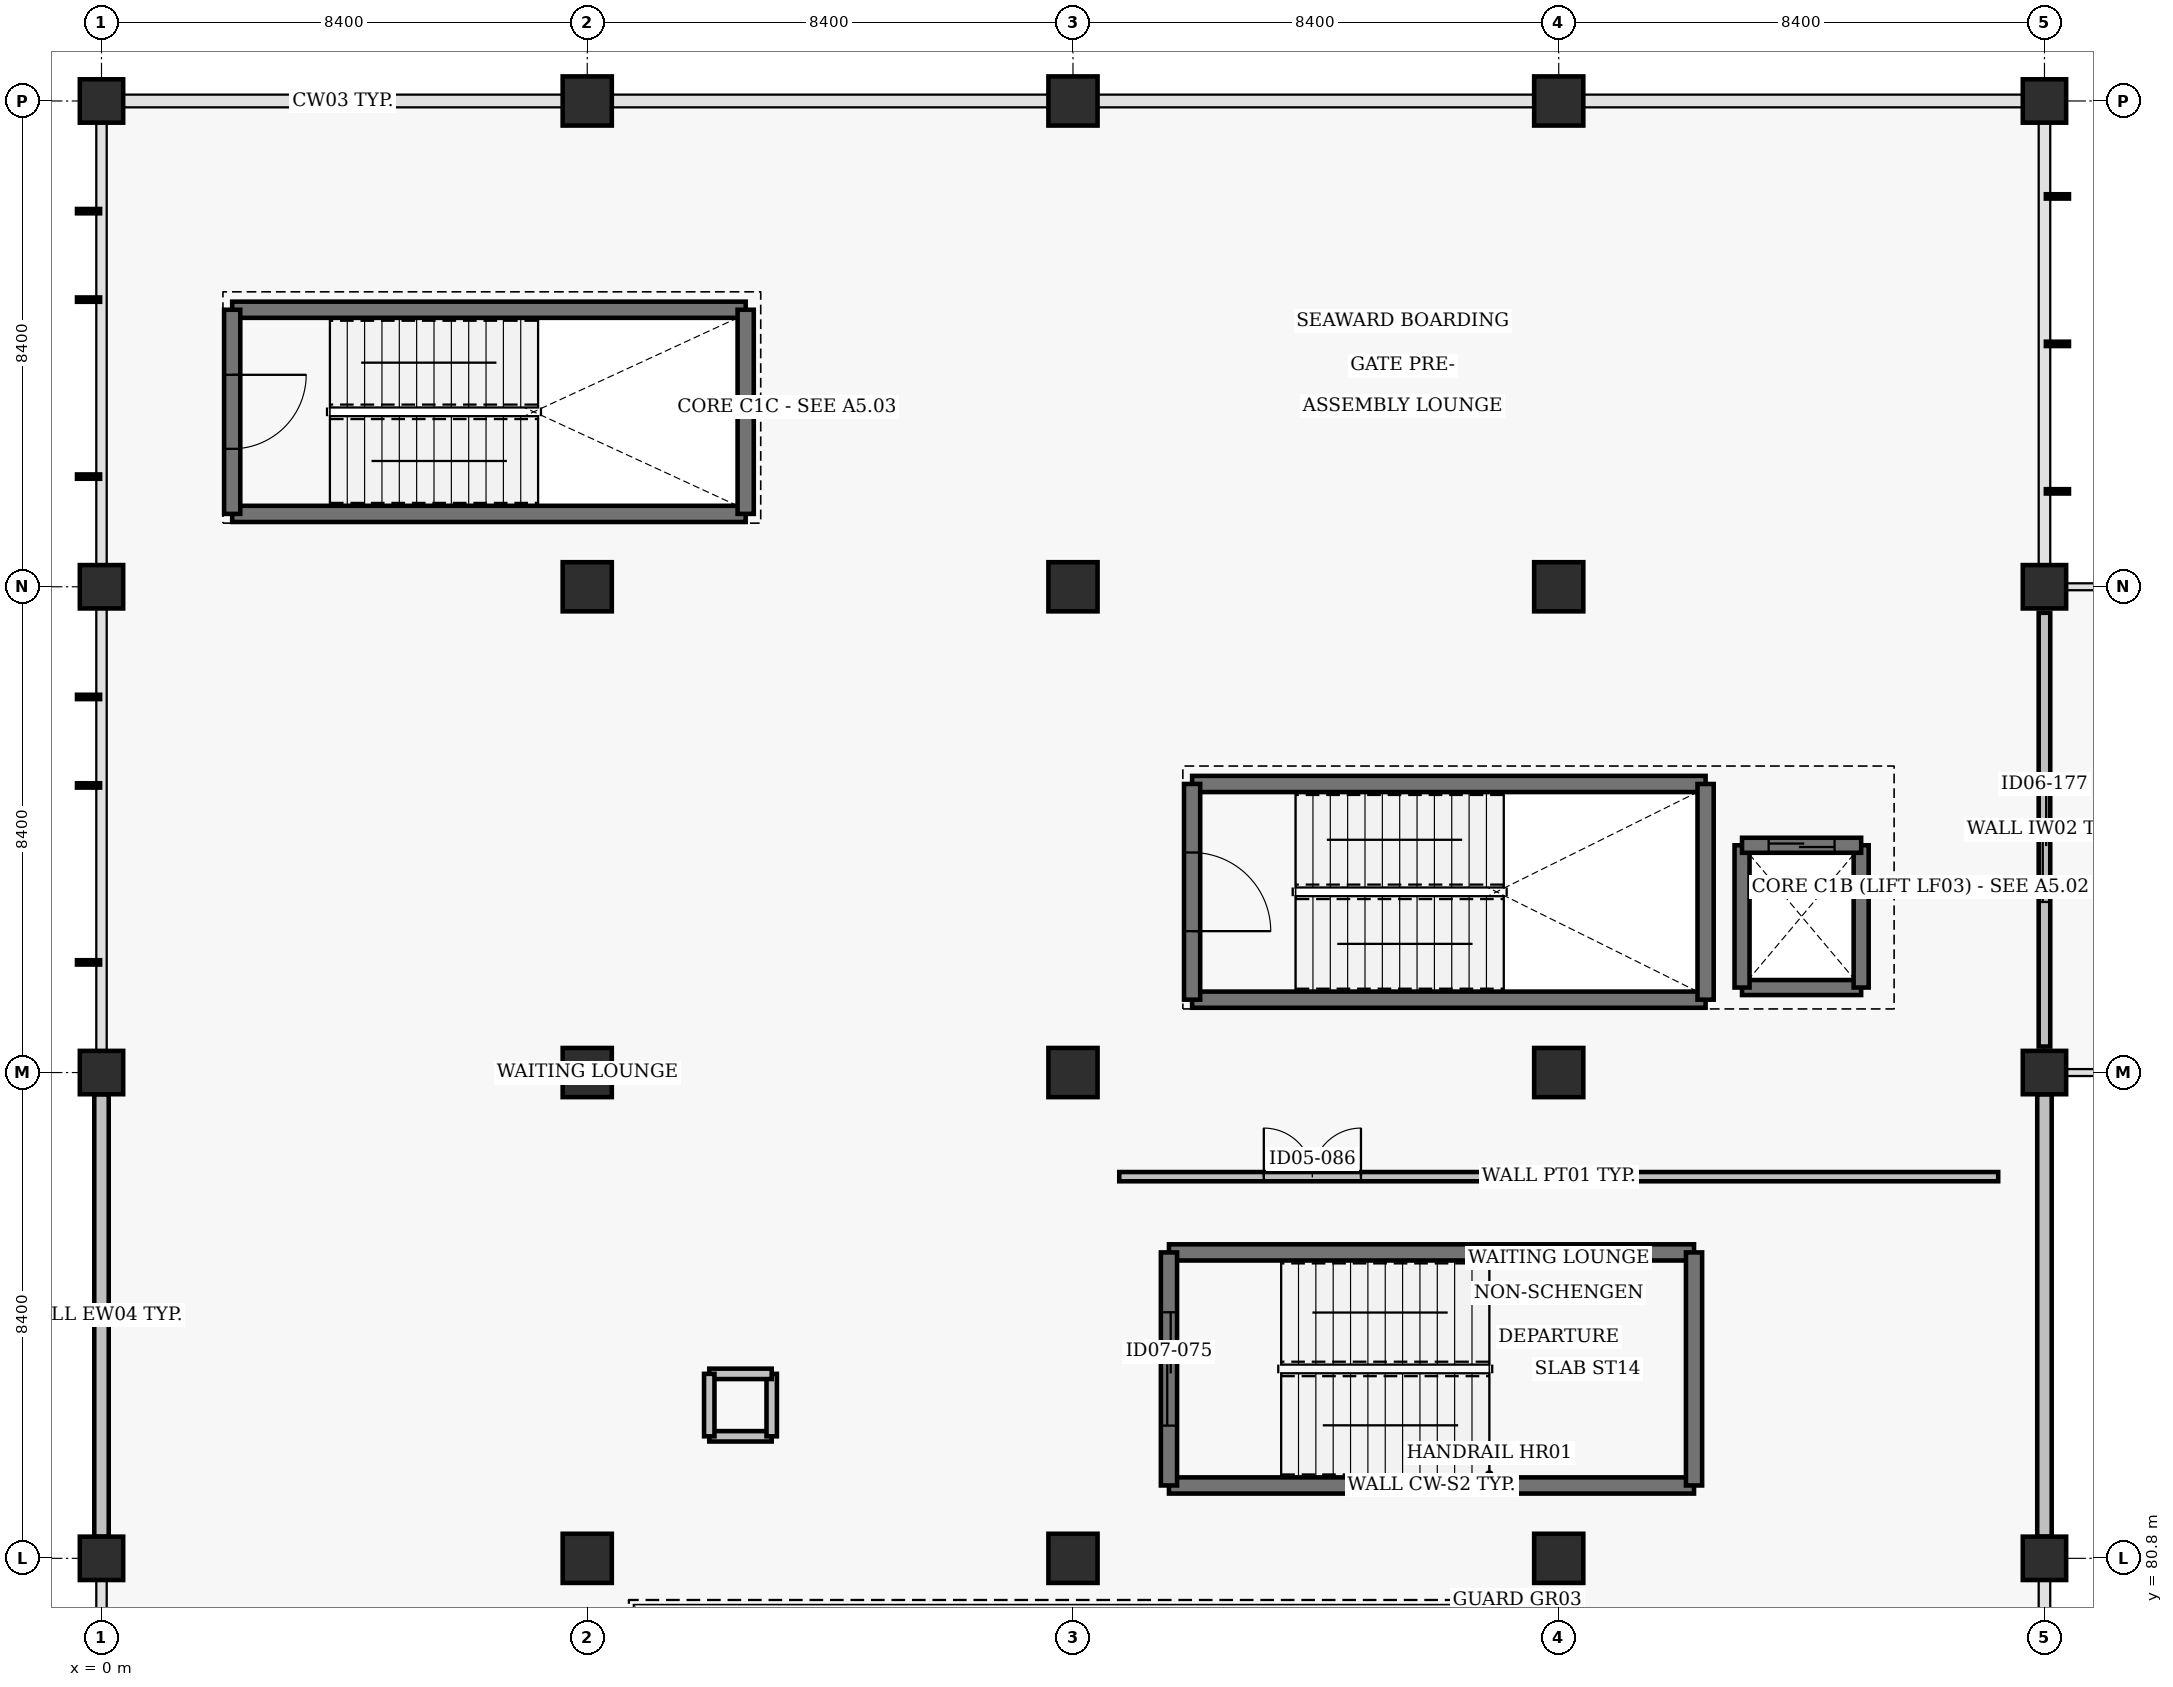
"""IFC4 building model, lengths in metres.
Left out: names, types, materials, properties, quantities, classifications, styles, units other than length and angle.
Written with IfcOpenShell. Run it as: python <this file> out.ifc"""

import sys

from ifc_helpers import new_model, si_unit, direction, frame, frame_2d, origin, origin_2d, place, context, subcontext, project, spatial, rectangle, circle, extrude, element, fill, save


model = new_model("IFC4")
c1 = context("Model", 3, precision=1e-05, world=origin(), true_north=direction((0.0, 1.0)))
c2 = subcontext(c1, "Body", "Model", "MODEL_VIEW")
j1 = project(units=[si_unit("LENGTHUNIT", "METRE"), si_unit("PLANEANGLEUNIT", "RADIAN")], contexts=[c1])
p1 = place(None, origin())
s1 = spatial("IfcSite", under=j1, at=p1, CompositionType="ELEMENT")
p2 = place(p1, origin())
s2 = spatial("IfcBuilding", under=s1, at=p2, CompositionType="ELEMENT")
p3 = place(p2, frame((0.0, 0.0, 5.44)))
s3 = spatial("IfcBuildingStorey", under=s2, at=p3, CompositionType="ELEMENT", Elevation=5.44)
for number, where, z_axis, x_axis in (
    (1, (0.0, 80.8, 0.0), (0.0, 0.0, 1.0), (1.0, 0.0, 0.0)),
    (2, (0.0, 89.2, 0.0), (0.0, 0.0, 1.0), (1.0, 0.0, 0.0)),
    (3, (0.0, 97.6, 0.0), (0.0, 0.0, 1.0), (1.0, 0.0, 0.0)),
    (4, (0.0, 106.0, 0.0), (0.0, 0.0, 1.0), (1.0, 0.0, 0.0)),
):
    element("IfcColumn", number, at=place(p3, frame(where, z_axis=z_axis, x_axis=x_axis)), inside=s3, PredefinedType="COLUMN", context=c2, shape_type="SweptSolid", body=[
        extrude(rectangle(XDim=0.75, YDim=0.75, at=origin_2d()), origin(), (0.0, 0.0, 1.0), 4.16),
    ])
for number, where, z_axis, x_axis in (
    (5, (8.4, 80.8, 0.0), (0.0, 0.0, 1.0), (1.0, 0.0, 0.0)),
    (6, (8.4, 89.2, 0.0), (0.0, 0.0, 1.0), (1.0, 0.0, 0.0)),
    (7, (8.4, 97.6, 0.0), (0.0, 0.0, 1.0), (1.0, 0.0, 0.0)),
    (8, (8.4, 106.0, 0.0), (0.0, 0.0, 1.0), (1.0, 0.0, 0.0)),
    (9, (16.8, 80.8, 0.0), (0.0, 0.0, 1.0), (1.0, 0.0, 0.0)),
    (10, (16.8, 89.2, 0.0), (0.0, 0.0, 1.0), (1.0, 0.0, 0.0)),
    (11, (16.8, 97.6, 0.0), (0.0, 0.0, 1.0), (1.0, 0.0, 0.0)),
    (12, (16.8, 106.0, 0.0), (0.0, 0.0, 1.0), (1.0, 0.0, 0.0)),
    (13, (25.2, 80.8, 0.0), (0.0, 0.0, 1.0), (1.0, 0.0, 0.0)),
    (14, (25.2, 89.2, 0.0), (0.0, 0.0, 1.0), (1.0, 0.0, 0.0)),
    (15, (25.2, 97.6, 0.0), (0.0, 0.0, 1.0), (1.0, 0.0, 0.0)),
    (16, (25.2, 106.0, 0.0), (0.0, 0.0, 1.0), (1.0, 0.0, 0.0)),
):
    element("IfcColumn", number, at=place(p3, frame(where, z_axis=z_axis, x_axis=x_axis)), inside=s3, PredefinedType="COLUMN", context=c2, shape_type="SweptSolid", body=[
        extrude(circle(Radius=0.425, at=origin_2d()), origin(), (0.0, 0.0, 1.0), 4.16),
    ])
for number, where, z_axis, x_axis in (
    (17, (33.6, 80.8, 0.0), (0.0, 0.0, 1.0), (1.0, 0.0, 0.0)),
    (18, (33.6, 89.2, 0.0), (0.0, 0.0, 1.0), (1.0, 0.0, 0.0)),
    (19, (33.6, 97.6, 0.0), (0.0, 0.0, 1.0), (1.0, 0.0, 0.0)),
    (20, (33.6, 106.0, 0.0), (0.0, 0.0, 1.0), (1.0, 0.0, 0.0)),
):
    element("IfcColumn", number, at=place(p3, frame(where, z_axis=z_axis, x_axis=x_axis)), inside=s3, PredefinedType="COLUMN", context=c2, shape_type="SweptSolid", body=[
        extrude(rectangle(XDim=0.75, YDim=0.75, at=origin_2d()), origin(), (0.0, 0.0, 1.0), 4.16),
    ])
for number, where, z_axis, x_axis in (
    (21, (0.0, 88.825, 0.0), (0.0, 0.0, 1.0), (0.0, -1.0, 0.0)),
    (22, (33.6, 81.175, 0.0), (0.0, 0.0, 1.0), (0.0, 1.0, 0.0)),
):
    element("IfcWall", number, at=place(p3, frame(where, z_axis=z_axis, x_axis=x_axis)), inside=s3, PredefinedType="SOLIDWALL", context=c2, shape_type="SweptSolid", body=[
        extrude(rectangle(XDim=7.65, YDim=0.25, at=frame_2d((3.825, 0.0))), origin(), (0.0, 0.0, 1.0), 3.515),
    ])
for number, where, z_axis, x_axis in (
    (23, (18.86, 90.46, 0.0), (0.0, 0.0, 1.0), (1.0, 0.0, 0.0)),
    (24, (18.86, 94.19, 0.0), (0.0, 0.0, 1.0), (1.0, 0.0, 0.0)),
):
    element("IfcWall", number, at=place(p3, frame(where, z_axis=z_axis, x_axis=x_axis)), inside=s3, PredefinedType="SHEAR", context=c2, shape_type="SweptSolid", body=[
        extrude(rectangle(XDim=8.88, YDim=0.28, at=frame_2d((4.44, 0.0))), origin(), (0.0, 0.0, 1.0), 4.16),
    ])
p4 = place(p3, frame((18.86, 94.19, 0.0), z_axis=(0.0, 0.0, 1.0), x_axis=(0.0, -1.0, 0.0)))
e25 = element("IfcWall", 25, at=p4, inside=s3, PredefinedType="SHEAR", context=c2, shape_type="SweptSolid", body=[
    extrude(rectangle(XDim=3.73, YDim=0.28, at=frame_2d((1.865, 0.0))), origin(), (0.0, 0.0, 1.0), 4.16),
])
p5 = place(p4, frame((1.185, 0.0, 0.0)))
e26 = element("IfcOpeningElement", 26, at=p5, cuts=e25, PredefinedType="OPENING", context=c2, shape_type="SweptSolid", body=[
    extrude(rectangle(XDim=1.36, YDim=2.15, at=frame_2d((0.68, 1.075))), frame((0.0, 0.15, 0.0), z_axis=(0.0, -1.0, 0.0), x_axis=(1.0, 0.0, 0.0)), (0.0, 0.0, 1.0), 0.3),
])
p6 = place(p3, frame((27.74, 90.46, 0.0), z_axis=(0.0, 0.0, 1.0), x_axis=(0.0, 1.0, 0.0)))
e27 = element("IfcWall", 27, at=p6, inside=s3, PredefinedType="SHEAR", context=c2, shape_type="SweptSolid", body=[
    extrude(rectangle(XDim=3.73, YDim=0.28, at=frame_2d((1.865, 0.0))), origin(), (0.0, 0.0, 1.0), 4.16),
])
p7 = place(p3, frame((28.37, 90.67, 0.0), z_axis=(0.0, 0.0, 1.0), x_axis=(1.0, 0.0, 0.0)))
e28 = element("IfcWall", 28, at=p7, inside=s3, PredefinedType="SHEAR", context=c2, shape_type="SweptSolid", body=[
    extrude(rectangle(XDim=2.06, YDim=0.26, at=frame_2d((1.03, 0.0))), origin(), (0.0, 0.0, 1.0), 4.16),
])
for number, where, z_axis, x_axis in (
    (29, (30.43, 90.67, 0.0), (0.0, 0.0, 1.0), (0.0, 1.0, 0.0)),
    (30, (28.37, 93.13, 0.0), (0.0, 0.0, 1.0), (0.0, -1.0, 0.0)),
):
    element("IfcWall", number, at=place(p3, frame(where, z_axis=z_axis, x_axis=x_axis)), inside=s3, PredefinedType="SHEAR", context=c2, shape_type="SweptSolid", body=[
        extrude(rectangle(XDim=2.46, YDim=0.26, at=frame_2d((1.23, 0.0))), origin(), (0.0, 0.0, 1.0), 4.16),
    ])
p8 = place(p3, frame((28.37, 93.13, 0.0), z_axis=(0.0, 0.0, 1.0), x_axis=(1.0, 0.0, 0.0)))
e31 = element("IfcWall", 31, at=p8, inside=s3, PredefinedType="SHEAR", context=c2, shape_type="SweptSolid", body=[
    extrude(rectangle(XDim=2.06, YDim=0.26, at=frame_2d((1.03, 0.0))), origin(), (0.0, 0.0, 1.0), 4.16),
])
p9 = place(p8, frame((0.46, 0.0, 0.0)))
e32 = element("IfcOpeningElement", 32, at=p9, cuts=e31, PredefinedType="OPENING", context=c2, shape_type="SweptSolid", body=[
    extrude(rectangle(XDim=1.14, YDim=2.14, at=frame_2d((0.57, 1.07))), frame((0.0, 0.14, 0.0), z_axis=(0.0, -1.0, 0.0), x_axis=(1.0, 0.0, 0.0)), (0.0, 0.0, 1.0), 0.28),
])
for number, where, z_axis, x_axis in (
    (33, (2.26, 98.86, 0.0), (0.0, 0.0, 1.0), (1.0, 0.0, 0.0)),
    (34, (2.26, 102.39, 0.0), (0.0, 0.0, 1.0), (1.0, 0.0, 0.0)),
):
    element("IfcWall", number, at=place(p3, frame(where, z_axis=z_axis, x_axis=x_axis)), inside=s3, PredefinedType="SHEAR", context=c2, shape_type="SweptSolid", body=[
        extrude(rectangle(XDim=8.88, YDim=0.28, at=frame_2d((4.44, 0.0))), origin(), (0.0, 0.0, 1.0), 4.16),
    ])
p10 = place(p3, frame((2.26, 102.39, 0.0), z_axis=(0.0, 0.0, 1.0), x_axis=(0.0, -1.0, 0.0)))
e35 = element("IfcWall", 35, at=p10, inside=s3, PredefinedType="SHEAR", context=c2, shape_type="SweptSolid", body=[
    extrude(rectangle(XDim=3.53, YDim=0.28, at=frame_2d((1.765, 0.0))), origin(), (0.0, 0.0, 1.0), 4.16),
])
p11 = place(p10, frame((1.125, 0.0, 0.0)))
e36 = element("IfcOpeningElement", 36, at=p11, cuts=e35, PredefinedType="OPENING", context=c2, shape_type="SweptSolid", body=[
    extrude(rectangle(XDim=1.28, YDim=2.1, at=frame_2d((0.64, 1.05))), frame((0.0, 0.15, 0.0), z_axis=(0.0, -1.0, 0.0), x_axis=(1.0, 0.0, 0.0)), (0.0, 0.0, 1.0), 0.3),
])
p12 = place(p3, frame((11.14, 98.86, 0.0), z_axis=(0.0, 0.0, 1.0), x_axis=(0.0, 1.0, 0.0)))
e37 = element("IfcWall", 37, at=p12, inside=s3, PredefinedType="SHEAR", context=c2, shape_type="SweptSolid", body=[
    extrude(rectangle(XDim=3.53, YDim=0.28, at=frame_2d((1.765, 0.0))), origin(), (0.0, 0.0, 1.0), 4.16),
])
for number, where, z_axis, x_axis in (
    (38, (18.46, 82.06, 0.0), (0.0, 0.0, 1.0), (1.0, 0.0, 0.0)),
    (39, (18.46, 86.09, 0.0), (0.0, 0.0, 1.0), (1.0, 0.0, 0.0)),
):
    element("IfcWall", number, at=place(p3, frame(where, z_axis=z_axis, x_axis=x_axis)), inside=s3, PredefinedType="SHEAR", context=c2, shape_type="SweptSolid", body=[
        extrude(rectangle(XDim=9.08, YDim=0.28, at=frame_2d((4.54, 0.0))), origin(), (0.0, 0.0, 1.0), 4.16),
    ])
p13 = place(p3, frame((18.46, 86.09, 0.0), z_axis=(0.0, 0.0, 1.0), x_axis=(0.0, -1.0, 0.0)))
e40 = element("IfcWall", 40, at=p13, inside=s3, PredefinedType="SHEAR", context=c2, shape_type="SweptSolid", body=[
    extrude(rectangle(XDim=4.03, YDim=0.28, at=frame_2d((2.015, 0.0))), origin(), (0.0, 0.0, 1.0), 4.16),
])
p14 = place(p13, frame((1.035, 0.0, 0.0)))
e41 = element("IfcOpeningElement", 41, at=p14, cuts=e40, PredefinedType="OPENING", context=c2, shape_type="SweptSolid", body=[
    extrude(rectangle(XDim=1.96, YDim=2.22, at=frame_2d((0.98, 1.11))), frame((0.0, 0.15, 0.0), z_axis=(0.0, -1.0, 0.0), x_axis=(1.0, 0.0, 0.0)), (0.0, 0.0, 1.0), 0.3),
])
p15 = place(p3, frame((27.54, 82.06, 0.0), z_axis=(0.0, 0.0, 1.0), x_axis=(0.0, 1.0, 0.0)))
e42 = element("IfcWall", 42, at=p15, inside=s3, PredefinedType="SHEAR", context=c2, shape_type="SweptSolid", body=[
    extrude(rectangle(XDim=4.03, YDim=0.28, at=frame_2d((2.015, 0.0))), origin(), (0.0, 0.0, 1.0), 4.16),
])
for number, where, z_axis, x_axis in (
    (43, (10.51, 82.91, 0.0), (0.0, 0.0, 1.0), (1.0, 0.0, 0.0)),
    (44, (11.59, 82.91, 0.0), (0.0, 0.0, 1.0), (0.0, 1.0, 0.0)),
    (45, (11.59, 83.99, 0.0), (0.0, 0.0, 1.0), (-1.0, 0.0, 0.0)),
    (46, (10.51, 83.99, 0.0), (0.0, 0.0, 1.0), (0.0, -1.0, 0.0)),
):
    element("IfcWall", number, at=place(p3, frame(where, z_axis=z_axis, x_axis=x_axis)), inside=s3, PredefinedType="SOLIDWALL", context=c2, shape_type="SweptSolid", body=[
        extrude(rectangle(XDim=1.08, YDim=0.18, at=frame_2d((0.54, 0.0))), origin(), (0.0, 0.0, 1.0), 2.6),
    ])
p16 = place(p3, frame((17.6, 87.4, 0.0), z_axis=(0.0, 0.0, 1.0), x_axis=(1.0, 0.0, 0.0)))
e47 = element("IfcWall", 47, at=p16, inside=s3, PredefinedType="PARTITIONING", context=c2, shape_type="SweptSolid", body=[
    extrude(rectangle(XDim=15.2, YDim=0.16, at=frame_2d((7.6, 0.0))), origin(), (0.0, 0.0, 1.0), 2.9),
])
p17 = place(p16, frame((2.5, 0.0, 0.0)))
e48 = element("IfcOpeningElement", 48, at=p17, cuts=e47, PredefinedType="OPENING", context=c2, shape_type="SweptSolid", body=[
    extrude(rectangle(XDim=1.68, YDim=2.18, at=frame_2d((0.84, 1.09))), frame((0.0, 0.09, 0.0), z_axis=(0.0, -1.0, 0.0), x_axis=(1.0, 0.0, 0.0)), (0.0, 0.0, 1.0), 0.18),
])
p18 = place(p3, frame((33.6, 89.65, 0.0), z_axis=(0.0, 0.0, 1.0), x_axis=(0.0, 1.0, 0.0)))
e49 = element("IfcWall", 49, at=p18, inside=s3, PredefinedType="SOLIDWALL", context=c2, shape_type="SweptSolid", body=[
    extrude(rectangle(XDim=7.5, YDim=0.2, at=frame_2d((3.75, 0.0))), origin(), (0.0, 0.0, 1.0), 3.515),
])
p19 = place(p18, frame((2.5, 0.0, 0.0)))
e50 = element("IfcOpeningElement", 50, at=p19, cuts=e49, PredefinedType="OPENING", context=c2, shape_type="SweptSolid", body=[
    extrude(rectangle(XDim=2.1, YDim=2.22, at=frame_2d((1.05, 1.11))), frame((0.0, 0.11, 0.0), z_axis=(0.0, -1.0, 0.0), x_axis=(1.0, 0.0, 0.0)), (0.0, 0.0, 1.0), 0.22),
])
p20 = place(p5, origin())
e51 = element("IfcDoor", 51, at=p20, inside=s3, OperationType="SINGLE_SWING_RIGHT", PredefinedType="DOOR", context=c2, shape_type="SweptSolid", body=[
    extrude(rectangle(XDim=1.36, YDim=2.15, at=frame_2d((0.68, 1.075))), frame((0.0, 0.025, 0.0), z_axis=(0.0, -1.0, 0.0), x_axis=(1.0, 0.0, 0.0)), (0.0, 0.0, 1.0), 0.05),
])
fill(e26, e51)
p21 = place(p9, origin())
e52 = element("IfcDoor", 52, at=p21, inside=s3, OperationType="DOUBLE_DOOR_SLIDING", PredefinedType="DOOR", context=c2, shape_type="SweptSolid", body=[
    extrude(rectangle(XDim=1.14, YDim=2.14, at=frame_2d((0.57, 1.07))), frame((0.0, 0.025, 0.0), z_axis=(0.0, -1.0, 0.0), x_axis=(1.0, 0.0, 0.0)), (0.0, 0.0, 1.0), 0.05),
])
fill(e32, e52)
p22 = place(p11, origin())
e53 = element("IfcDoor", 53, at=p22, inside=s3, OperationType="SINGLE_SWING_LEFT", PredefinedType="DOOR", context=c2, shape_type="SweptSolid", body=[
    extrude(rectangle(XDim=1.28, YDim=2.1, at=frame_2d((0.64, 1.05))), frame((0.0, 0.025, 0.0), z_axis=(0.0, -1.0, 0.0), x_axis=(1.0, 0.0, 0.0)), (0.0, 0.0, 1.0), 0.05),
])
fill(e36, e53)
p23 = place(p14, origin())
e54 = element("IfcDoor", 54, at=p23, inside=s3, OperationType="DOUBLE_DOOR_SLIDING", PredefinedType="DOOR", context=c2, shape_type="SweptSolid", body=[
    extrude(rectangle(XDim=1.96, YDim=2.22, at=frame_2d((0.98, 1.11))), frame((0.0, 0.025, 0.0), z_axis=(0.0, -1.0, 0.0), x_axis=(1.0, 0.0, 0.0)), (0.0, 0.0, 1.0), 0.05),
])
fill(e41, e54)
p24 = place(p17, origin())
e55 = element("IfcDoor", 55, at=p24, inside=s3, OperationType="DOUBLE_DOOR_SINGLE_SWING", PredefinedType="DOOR", context=c2, shape_type="SweptSolid", body=[
    extrude(rectangle(XDim=1.68, YDim=2.18, at=frame_2d((0.84, 1.09))), frame((0.0, 0.025, 0.0), z_axis=(0.0, -1.0, 0.0), x_axis=(1.0, 0.0, 0.0)), (0.0, 0.0, 1.0), 0.05),
])
fill(e48, e55)
p25 = place(p19, origin())
e56 = element("IfcDoor", 56, at=p25, inside=s3, OperationType="DOUBLE_DOOR_SLIDING", PredefinedType="DOOR", context=c2, shape_type="SweptSolid", body=[
    extrude(rectangle(XDim=2.1, YDim=2.22, at=frame_2d((1.05, 1.11))), frame((0.0, 0.025, 0.0), z_axis=(0.0, -1.0, 0.0), x_axis=(1.0, 0.0, 0.0)), (0.0, 0.0, 1.0), 0.05),
])
fill(e50, e56)
save(model, sys.argv[1])
